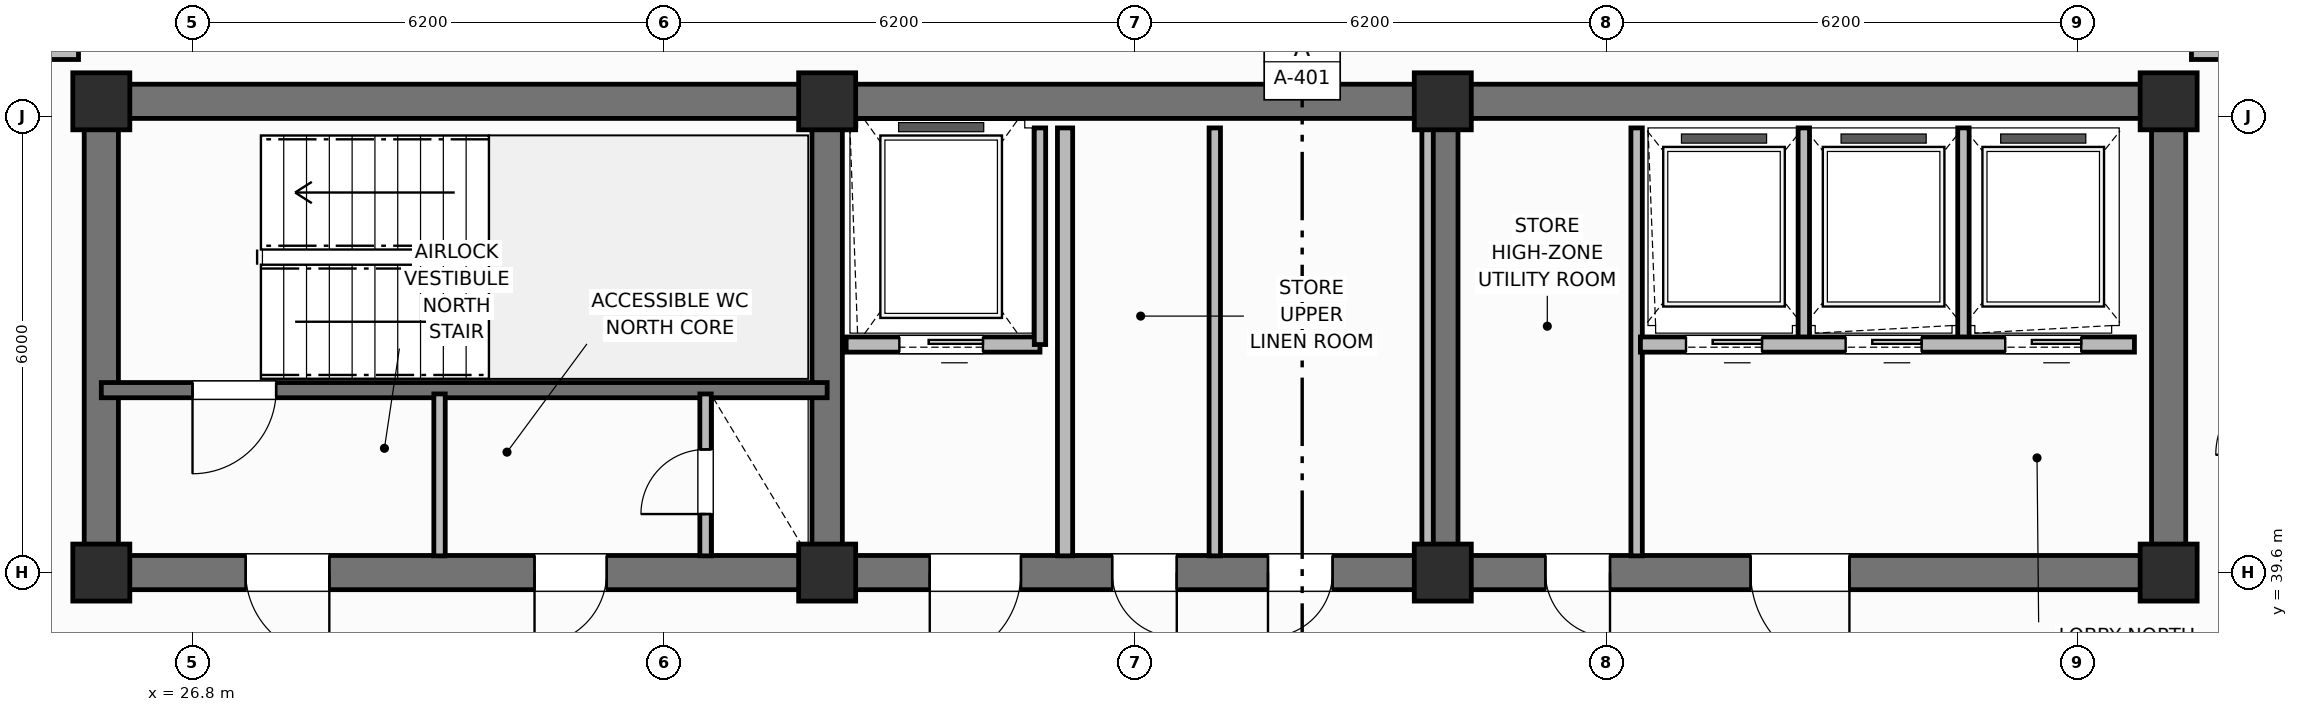
"""IFC4 building model, lengths in metres.
Left out: names, types, materials, properties, quantities, classifications, styles, units other than length and angle.
Written with IfcOpenShell. Run it as: python <this file> out.ifc"""

import sys

from ifc_helpers import new_model, si_unit, direction, frame, frame_2d, origin, origin_2d, place, context, subcontext, project, spatial, rectangle, extrude, element, fill, save


model = new_model("IFC4")
c1 = context("Model", 3, precision=1e-05, world=origin(), true_north=direction((0.0, 1.0)))
c2 = subcontext(c1, "Body", "Model", "MODEL_VIEW")
j1 = project(units=[si_unit("LENGTHUNIT", "METRE"), si_unit("PLANEANGLEUNIT", "RADIAN")], contexts=[c1])
p1 = place(None, origin())
s1 = spatial("IfcSite", under=j1, at=p1, CompositionType="ELEMENT")
p2 = place(p1, origin())
s2 = spatial("IfcBuilding", under=s1, at=p2, CompositionType="ELEMENT")
p3 = place(p2, frame((0.0, 0.0, 278.7)))
s3 = spatial("IfcBuildingStorey", under=s2, at=p3, CompositionType="ELEMENT", Elevation=278.7)
p4 = place(p3, frame((25.6, 45.8, 0.0), z_axis=(0.0, 0.0, 1.0), x_axis=(1.0, 0.0, 0.0)))
e1 = element("IfcWall", 1, at=p4, inside=s3, PredefinedType="SHEAR", context=c2, shape_type="SweptSolid", body=[
    extrude(rectangle(XDim=27.2, YDim=0.45, at=frame_2d((13.6, 0.0))), origin(), (0.0, 0.0, 1.0), 3.7),
])
for number, where, z_axis, x_axis in (
    (2, (25.6, 39.825, 0.0), (0.0, 0.0, 1.0), (0.0, 1.0, 0.0)),
    (3, (52.8, 39.825, 0.0), (0.0, 0.0, 1.0), (0.0, 1.0, 0.0)),
):
    element("IfcWall", number, at=place(p3, frame(where, z_axis=z_axis, x_axis=x_axis)), inside=s3, PredefinedType="SHEAR", context=c2, shape_type="SweptSolid", body=[
        extrude(rectangle(XDim=5.75, YDim=0.45, at=frame_2d((2.875, 0.0))), origin(), (0.0, 0.0, 1.0), 3.7),
    ])
p5 = place(p3, frame((52.8, 39.6, 0.0), z_axis=(0.0, 0.0, 1.0), x_axis=(-1.0, 0.0, 0.0)))
e4 = element("IfcWall", 4, at=p5, inside=s3, PredefinedType="SHEAR", context=c2, shape_type="SweptSolid", body=[
    extrude(rectangle(XDim=27.2, YDim=0.45, at=frame_2d((13.6, 0.0))), origin(), (0.0, 0.0, 1.0), 3.7),
])
p6 = place(p5, frame((24.2, 0.0, 0.0)))
e5 = element("IfcOpeningElement", 5, at=p6, cuts=e4, PredefinedType="OPENING", context=c2, shape_type="SweptSolid", body=[
    extrude(rectangle(XDim=1.1, YDim=2.15, at=frame_2d((0.55, 1.075))), frame((0.0, 0.235, 0.0), z_axis=(0.0, -1.0, 0.0), x_axis=(1.0, 0.0, 0.0)), (0.0, 0.0, 1.0), 0.47),
])
p7 = place(p5, frame((20.55, 0.0, 0.0)))
e6 = element("IfcOpeningElement", 6, at=p7, cuts=e4, PredefinedType="OPENING", context=c2, shape_type="SweptSolid", body=[
    extrude(rectangle(XDim=0.95, YDim=2.1, at=frame_2d((0.475, 1.05))), frame((0.0, 0.235, 0.0), z_axis=(0.0, -1.0, 0.0), x_axis=(1.0, 0.0, 0.0)), (0.0, 0.0, 1.0), 0.47),
])
p8 = place(p5, frame((15.1, 0.0, 0.0)))
e7 = element("IfcOpeningElement", 7, at=p8, cuts=e4, PredefinedType="OPENING", context=c2, shape_type="SweptSolid", body=[
    extrude(rectangle(XDim=1.2, YDim=2.15, at=frame_2d((0.6, 1.075))), frame((0.0, 0.235, 0.0), z_axis=(0.0, -1.0, 0.0), x_axis=(1.0, 0.0, 0.0)), (0.0, 0.0, 1.0), 0.47),
])
p9 = place(p5, frame((13.05, 0.0, 0.0)))
e8 = element("IfcOpeningElement", 8, at=p9, cuts=e4, PredefinedType="OPENING", context=c2, shape_type="SweptSolid", body=[
    extrude(rectangle(XDim=0.85, YDim=2.1, at=frame_2d((0.425, 1.05))), frame((0.0, 0.235, 0.0), z_axis=(0.0, -1.0, 0.0), x_axis=(1.0, 0.0, 0.0)), (0.0, 0.0, 1.0), 0.47),
])
p10 = place(p5, frame((11.0, 0.0, 0.0)))
e9 = element("IfcOpeningElement", 9, at=p10, cuts=e4, PredefinedType="OPENING", context=c2, shape_type="SweptSolid", body=[
    extrude(rectangle(XDim=0.85, YDim=2.1, at=frame_2d((0.425, 1.05))), frame((0.0, 0.235, 0.0), z_axis=(0.0, -1.0, 0.0), x_axis=(1.0, 0.0, 0.0)), (0.0, 0.0, 1.0), 0.47),
])
p11 = place(p5, frame((7.35, 0.0, 0.0)))
e10 = element("IfcOpeningElement", 10, at=p11, cuts=e4, PredefinedType="OPENING", context=c2, shape_type="SweptSolid", body=[
    extrude(rectangle(XDim=0.85, YDim=2.1, at=frame_2d((0.425, 1.05))), frame((0.0, 0.235, 0.0), z_axis=(0.0, -1.0, 0.0), x_axis=(1.0, 0.0, 0.0)), (0.0, 0.0, 1.0), 0.47),
])
p12 = place(p5, frame((4.2, 0.0, 0.0)))
e11 = element("IfcOpeningElement", 11, at=p12, cuts=e4, PredefinedType="OPENING", context=c2, shape_type="SweptSolid", body=[
    extrude(rectangle(XDim=1.3, YDim=2.2, at=frame_2d((0.65, 1.1))), frame((0.0, 0.235, 0.0), z_axis=(0.0, -1.0, 0.0), x_axis=(1.0, 0.0, 0.0)), (0.0, 0.0, 1.0), 0.47),
])
for number, where, z_axis, x_axis in (
    (12, (35.15, 39.825, 0.0), (0.0, 0.0, 1.0), (0.0, 1.0, 0.0)),
    (13, (43.25, 39.825, 0.0), (0.0, 0.0, 1.0), (0.0, 1.0, 0.0)),
):
    element("IfcWall", number, at=place(p3, frame(where, z_axis=z_axis, x_axis=x_axis)), inside=s3, PredefinedType="SHEAR", context=c2, shape_type="SweptSolid", body=[
        extrude(rectangle(XDim=5.75, YDim=0.4, at=frame_2d((2.875, 0.0))), origin(), (0.0, 0.0, 1.0), 3.7),
    ])
for number, where, z_axis, x_axis in (
    (14, (25.6, 39.6, 0.0), (0.0, 0.0, 1.0), (1.0, 0.0, 0.0)),
    (15, (25.6, 45.8, 0.0), (0.0, 0.0, 1.0), (1.0, 0.0, 0.0)),
    (16, (35.15, 39.6, 0.0), (0.0, 0.0, 1.0), (1.0, 0.0, 0.0)),
    (17, (35.15, 45.8, 0.0), (0.0, 0.0, 1.0), (1.0, 0.0, 0.0)),
    (18, (43.25, 39.6, 0.0), (0.0, 0.0, 1.0), (1.0, 0.0, 0.0)),
    (19, (43.25, 45.8, 0.0), (0.0, 0.0, 1.0), (1.0, 0.0, 0.0)),
    (20, (52.8, 39.6, 0.0), (0.0, 0.0, 1.0), (1.0, 0.0, 0.0)),
    (21, (52.8, 45.8, 0.0), (0.0, 0.0, 1.0), (1.0, 0.0, 0.0)),
):
    element("IfcColumn", number, at=place(p3, frame(where, z_axis=z_axis, x_axis=x_axis)), inside=s3, PredefinedType="COLUMN", context=c2, shape_type="SweptSolid", body=[
        extrude(rectangle(XDim=0.75, YDim=0.75, at=origin_2d()), origin(), (0.0, 0.0, 1.0), 3.7),
    ])
p13 = place(p3, frame((35.15, 42.0, 0.0), z_axis=(0.0, 0.0, 1.0), x_axis=(-1.0, 0.0, 0.0)))
e22 = element("IfcWall", 22, at=p13, inside=s3, PredefinedType="SHEAR", context=c2, shape_type="SweptSolid", body=[
    extrude(rectangle(XDim=9.55, YDim=0.2, at=frame_2d((4.775, 0.0))), origin(), (0.0, 0.0, 1.0), 3.7),
])
p14 = place(p13, frame((7.25, 0.0, 0.0)))
e23 = element("IfcOpeningElement", 23, at=p14, cuts=e22, PredefinedType="OPENING", context=c2, shape_type="SweptSolid", body=[
    extrude(rectangle(XDim=1.1, YDim=2.15, at=frame_2d((0.55, 1.075))), frame((0.0, 0.11, 0.0), z_axis=(0.0, -1.0, 0.0), x_axis=(1.0, 0.0, 0.0)), (0.0, 0.0, 1.0), 0.22),
])
p15 = place(p3, frame((33.55, 39.82, 0.0), z_axis=(0.0, 0.0, 1.0), x_axis=(0.0, 1.0, 0.0)))
e24 = element("IfcWall", 24, at=p15, inside=s3, PredefinedType="PARTITIONING", context=c2, shape_type="SweptSolid", body=[
    extrude(rectangle(XDim=2.13, YDim=0.15, at=frame_2d((1.065, 0.0))), origin(), (0.0, 0.0, 1.0), 2.56),
])
p16 = place(p15, frame((0.55, 0.0, 0.0)))
e25 = element("IfcOpeningElement", 25, at=p16, cuts=e24, PredefinedType="OPENING", context=c2, shape_type="SweptSolid", body=[
    extrude(rectangle(XDim=0.85, YDim=2.05, at=frame_2d((0.425, 1.025))), frame((0.0, 0.085, 0.0), z_axis=(0.0, -1.0, 0.0), x_axis=(1.0, 0.0, 0.0)), (0.0, 0.0, 1.0), 0.17),
])
p17 = place(p3, frame((30.05, 39.82, 0.0), z_axis=(0.0, 0.0, 1.0), x_axis=(0.0, 1.0, 0.0)))
e26 = element("IfcWall", 26, at=p17, inside=s3, PredefinedType="PARTITIONING", context=c2, shape_type="SweptSolid", body=[
    extrude(rectangle(XDim=2.13, YDim=0.15, at=frame_2d((1.065, 0.0))), origin(), (0.0, 0.0, 1.0), 2.56),
])
p18 = place(p3, frame((37.95, 42.6, 0.0), z_axis=(0.0, 0.0, 1.0), x_axis=(-1.0, 0.0, 0.0)))
e27 = element("IfcWall", 27, at=p18, inside=s3, PredefinedType="PARTITIONING", context=c2, shape_type="SweptSolid", body=[
    extrude(rectangle(XDim=2.55, YDim=0.2, at=frame_2d((1.275, 0.0))), origin(), (0.0, 0.0, 1.0), 2.33),
])
p19 = place(p18, frame((0.75, 0.0, 0.0)))
e28 = element("IfcOpeningElement", 28, at=p19, cuts=e27, PredefinedType="OPENING", context=c2, shape_type="SweptSolid", body=[
    extrude(rectangle(XDim=1.1, YDim=2.15, at=frame_2d((0.55, 1.075))), frame((0.0, 0.11, 0.0), z_axis=(0.0, -1.0, 0.0), x_axis=(1.0, 0.0, 0.0)), (0.0, 0.0, 1.0), 0.22),
])
p20 = place(p3, frame((37.95, 42.6, 0.0), z_axis=(0.0, 0.0, 1.0), x_axis=(0.0, 1.0, 0.0)))
e29 = element("IfcWall", 29, at=p20, inside=s3, PredefinedType="PARTITIONING", context=c2, shape_type="SweptSolid", body=[
    extrude(rectangle(XDim=2.85, YDim=0.15, at=frame_2d((1.425, 0.0))), origin(), (0.0, 0.0, 1.0), 2.56),
])
p21 = place(p3, frame((38.28, 39.82, 0.0), z_axis=(0.0, 0.0, 1.0), x_axis=(0.0, 1.0, 0.0)))
e30 = element("IfcWall", 30, at=p21, inside=s3, PredefinedType="PARTITIONING", context=c2, shape_type="SweptSolid", body=[
    extrude(rectangle(XDim=5.63, YDim=0.2, at=frame_2d((2.815, 0.0))), origin(), (0.0, 0.0, 1.0), 2.56),
])
for number, where, z_axis, x_axis in (
    (31, (43.05, 39.82, 0.0), (0.0, 0.0, 1.0), (0.0, 1.0, 0.0)),
    (32, (40.25, 39.82, 0.0), (0.0, 0.0, 1.0), (0.0, 1.0, 0.0)),
    (33, (45.8, 39.82, 0.0), (0.0, 0.0, 1.0), (0.0, 1.0, 0.0)),
):
    element("IfcWall", number, at=place(p3, frame(where, z_axis=z_axis, x_axis=x_axis)), inside=s3, PredefinedType="PARTITIONING", context=c2, shape_type="SweptSolid", body=[
        extrude(rectangle(XDim=5.63, YDim=0.15, at=frame_2d((2.815, 0.0))), origin(), (0.0, 0.0, 1.0), 2.56),
    ])
for number, where, z_axis, x_axis in (
    (34, (48.0, 42.65, 0.0), (0.0, 0.0, 1.0), (0.0, 1.0, 0.0)),
    (35, (50.1, 42.65, 0.0), (0.0, 0.0, 1.0), (0.0, 1.0, 0.0)),
):
    element("IfcWall", number, at=place(p3, frame(where, z_axis=z_axis, x_axis=x_axis)), inside=s3, PredefinedType="PARTITIONING", context=c2, shape_type="SweptSolid", body=[
        extrude(rectangle(XDim=2.8, YDim=0.15, at=frame_2d((1.4, 0.0))), origin(), (0.0, 0.0, 1.0), 2.56),
    ])
p22 = place(p3, frame((52.35, 42.6, 0.0), z_axis=(0.0, 0.0, 1.0), x_axis=(-1.0, 0.0, 0.0)))
e36 = element("IfcWall", 36, at=p22, inside=s3, PredefinedType="PARTITIONING", context=c2, shape_type="SweptSolid", body=[
    extrude(rectangle(XDim=6.5, YDim=0.2, at=frame_2d((3.25, 0.0))), origin(), (0.0, 0.0, 1.0), 2.56),
])
p23 = place(p22, frame((4.9, 0.0, 0.0)))
e37 = element("IfcOpeningElement", 37, at=p23, cuts=e36, PredefinedType="OPENING", context=c2, shape_type="SweptSolid", body=[
    extrude(rectangle(XDim=1.0, YDim=2.15, at=frame_2d((0.5, 1.075))), frame((0.0, 0.11, 0.0), z_axis=(0.0, -1.0, 0.0), x_axis=(1.0, 0.0, 0.0)), (0.0, 0.0, 1.0), 0.22),
])
p24 = place(p22, frame((2.8, 0.0, 0.0)))
e38 = element("IfcOpeningElement", 38, at=p24, cuts=e36, PredefinedType="OPENING", context=c2, shape_type="SweptSolid", body=[
    extrude(rectangle(XDim=1.0, YDim=2.15, at=frame_2d((0.5, 1.075))), frame((0.0, 0.11, 0.0), z_axis=(0.0, -1.0, 0.0), x_axis=(1.0, 0.0, 0.0)), (0.0, 0.0, 1.0), 0.22),
])
p25 = place(p22, frame((0.7, 0.0, 0.0)))
e39 = element("IfcOpeningElement", 39, at=p25, cuts=e36, PredefinedType="OPENING", context=c2, shape_type="SweptSolid", body=[
    extrude(rectangle(XDim=1.0, YDim=2.15, at=frame_2d((0.5, 1.075))), frame((0.0, 0.11, 0.0), z_axis=(0.0, -1.0, 0.0), x_axis=(1.0, 0.0, 0.0)), (0.0, 0.0, 1.0), 0.22),
])
p26 = place(p3, frame((21.546, 46.45, 0.0), z_axis=(0.0, 0.0, 1.0), x_axis=(1.0, 0.0, 0.0)))
e40 = element("IfcWall", 40, at=p26, inside=s3, PredefinedType="PARTITIONING", context=c2, shape_type="SweptSolid", body=[
    extrude(rectangle(XDim=3.754, YDim=0.2, at=frame_2d((1.877, 0.0))), origin(), (0.0, 0.0, 1.0), 2.56),
])
p27 = place(p3, frame((53.1, 46.45, 0.0), z_axis=(0.0, 0.0, 1.0), x_axis=(1.0, 0.0, 0.0)))
e41 = element("IfcWall", 41, at=p27, inside=s3, PredefinedType="PARTITIONING", context=c2, shape_type="SweptSolid", body=[
    extrude(rectangle(XDim=3.754, YDim=0.2, at=frame_2d((1.877, 0.0))), origin(), (0.0, 0.0, 1.0), 2.56),
])
p28 = place(p14, origin())
e42 = element("IfcDoor", 42, at=p28, inside=s3, OperationType="SINGLE_SWING_RIGHT", PredefinedType="DOOR", context=c2, shape_type="SweptSolid", body=[
    extrude(rectangle(XDim=1.1, YDim=2.15, at=frame_2d((0.55, 1.075))), frame((0.0, 0.025, 0.0), z_axis=(0.0, -1.0, 0.0), x_axis=(1.0, 0.0, 0.0)), (0.0, 0.0, 1.0), 0.05),
])
fill(e23, e42)
p29 = place(p16, origin())
e43 = element("IfcDoor", 43, at=p29, inside=s3, OperationType="SINGLE_SWING_LEFT", PredefinedType="TRAPDOOR", context=c2, shape_type="SweptSolid", body=[
    extrude(rectangle(XDim=0.85, YDim=2.05, at=frame_2d((0.425, 1.025))), frame((0.0, 0.025, 0.0), z_axis=(0.0, -1.0, 0.0), x_axis=(1.0, 0.0, 0.0)), (0.0, 0.0, 1.0), 0.05),
])
fill(e25, e43)
p30 = place(p19, origin())
e44 = element("IfcDoor", 44, at=p30, inside=s3, OperationType="SLIDING_TO_LEFT", PredefinedType="DOOR", context=c2, shape_type="SweptSolid", body=[
    extrude(rectangle(XDim=1.1, YDim=2.15, at=frame_2d((0.55, 1.075))), frame((0.0, 0.025, 0.0), z_axis=(0.0, -1.0, 0.0), x_axis=(1.0, 0.0, 0.0)), (0.0, 0.0, 1.0), 0.05),
])
fill(e28, e44)
p31 = place(p23, origin())
e45 = element("IfcDoor", 45, at=p31, inside=s3, OperationType="SLIDING_TO_LEFT", PredefinedType="DOOR", context=c2, shape_type="SweptSolid", body=[
    extrude(rectangle(XDim=1.0, YDim=2.15, at=frame_2d((0.5, 1.075))), frame((0.0, 0.025, 0.0), z_axis=(0.0, -1.0, 0.0), x_axis=(1.0, 0.0, 0.0)), (0.0, 0.0, 1.0), 0.05),
])
fill(e37, e45)
p32 = place(p24, origin())
e46 = element("IfcDoor", 46, at=p32, inside=s3, OperationType="SLIDING_TO_LEFT", PredefinedType="DOOR", context=c2, shape_type="SweptSolid", body=[
    extrude(rectangle(XDim=1.0, YDim=2.15, at=frame_2d((0.5, 1.075))), frame((0.0, 0.025, 0.0), z_axis=(0.0, -1.0, 0.0), x_axis=(1.0, 0.0, 0.0)), (0.0, 0.0, 1.0), 0.05),
])
fill(e38, e46)
p33 = place(p25, origin())
e47 = element("IfcDoor", 47, at=p33, inside=s3, OperationType="SLIDING_TO_LEFT", PredefinedType="DOOR", context=c2, shape_type="SweptSolid", body=[
    extrude(rectangle(XDim=1.0, YDim=2.15, at=frame_2d((0.5, 1.075))), frame((0.0, 0.025, 0.0), z_axis=(0.0, -1.0, 0.0), x_axis=(1.0, 0.0, 0.0)), (0.0, 0.0, 1.0), 0.05),
])
fill(e39, e47)
p34 = place(p6, origin())
e48 = element("IfcDoor", 48, at=p34, inside=s3, OperationType="SINGLE_SWING_LEFT", PredefinedType="DOOR", context=c2, shape_type="SweptSolid", body=[
    extrude(rectangle(XDim=1.1, YDim=2.15, at=frame_2d((0.55, 1.075))), frame((0.0, 0.025, 0.0), z_axis=(0.0, -1.0, 0.0), x_axis=(1.0, 0.0, 0.0)), (0.0, 0.0, 1.0), 0.05),
])
fill(e5, e48)
p35 = place(p7, origin())
e49 = element("IfcDoor", 49, at=p35, inside=s3, OperationType="SINGLE_SWING_RIGHT", PredefinedType="DOOR", context=c2, shape_type="SweptSolid", body=[
    extrude(rectangle(XDim=0.95, YDim=2.1, at=frame_2d((0.475, 1.05))), frame((0.0, 0.025, 0.0), z_axis=(0.0, -1.0, 0.0), x_axis=(1.0, 0.0, 0.0)), (0.0, 0.0, 1.0), 0.05),
])
fill(e6, e49)
p36 = place(p8, origin())
e50 = element("IfcDoor", 50, at=p36, inside=s3, OperationType="SINGLE_SWING_RIGHT", PredefinedType="DOOR", context=c2, shape_type="SweptSolid", body=[
    extrude(rectangle(XDim=1.2, YDim=2.15, at=frame_2d((0.6, 1.075))), frame((0.0, 0.025, 0.0), z_axis=(0.0, -1.0, 0.0), x_axis=(1.0, 0.0, 0.0)), (0.0, 0.0, 1.0), 0.05),
])
fill(e7, e50)
p37 = place(p9, origin())
e51 = element("IfcDoor", 51, at=p37, inside=s3, OperationType="SINGLE_SWING_LEFT", PredefinedType="DOOR", context=c2, shape_type="SweptSolid", body=[
    extrude(rectangle(XDim=0.85, YDim=2.1, at=frame_2d((0.425, 1.05))), frame((0.0, 0.025, 0.0), z_axis=(0.0, -1.0, 0.0), x_axis=(1.0, 0.0, 0.0)), (0.0, 0.0, 1.0), 0.05),
])
fill(e8, e51)
p38 = place(p10, origin())
e52 = element("IfcDoor", 52, at=p38, inside=s3, OperationType="SINGLE_SWING_RIGHT", PredefinedType="DOOR", context=c2, shape_type="SweptSolid", body=[
    extrude(rectangle(XDim=0.85, YDim=2.1, at=frame_2d((0.425, 1.05))), frame((0.0, 0.025, 0.0), z_axis=(0.0, -1.0, 0.0), x_axis=(1.0, 0.0, 0.0)), (0.0, 0.0, 1.0), 0.05),
])
fill(e9, e52)
p39 = place(p11, origin())
e53 = element("IfcDoor", 53, at=p39, inside=s3, OperationType="SINGLE_SWING_LEFT", PredefinedType="DOOR", context=c2, shape_type="SweptSolid", body=[
    extrude(rectangle(XDim=0.85, YDim=2.1, at=frame_2d((0.425, 1.05))), frame((0.0, 0.025, 0.0), z_axis=(0.0, -1.0, 0.0), x_axis=(1.0, 0.0, 0.0)), (0.0, 0.0, 1.0), 0.05),
])
fill(e10, e53)
p40 = place(p12, origin())
e54 = element("IfcDoor", 54, at=p40, inside=s3, OperationType="SINGLE_SWING_LEFT", PredefinedType="DOOR", context=c2, shape_type="SweptSolid", body=[
    extrude(rectangle(XDim=1.3, YDim=2.2, at=frame_2d((0.65, 1.1))), frame((0.0, 0.025, 0.0), z_axis=(0.0, -1.0, 0.0), x_axis=(1.0, 0.0, 0.0)), (0.0, 0.0, 1.0), 0.05),
])
fill(e11, e54)
save(model, sys.argv[1])
